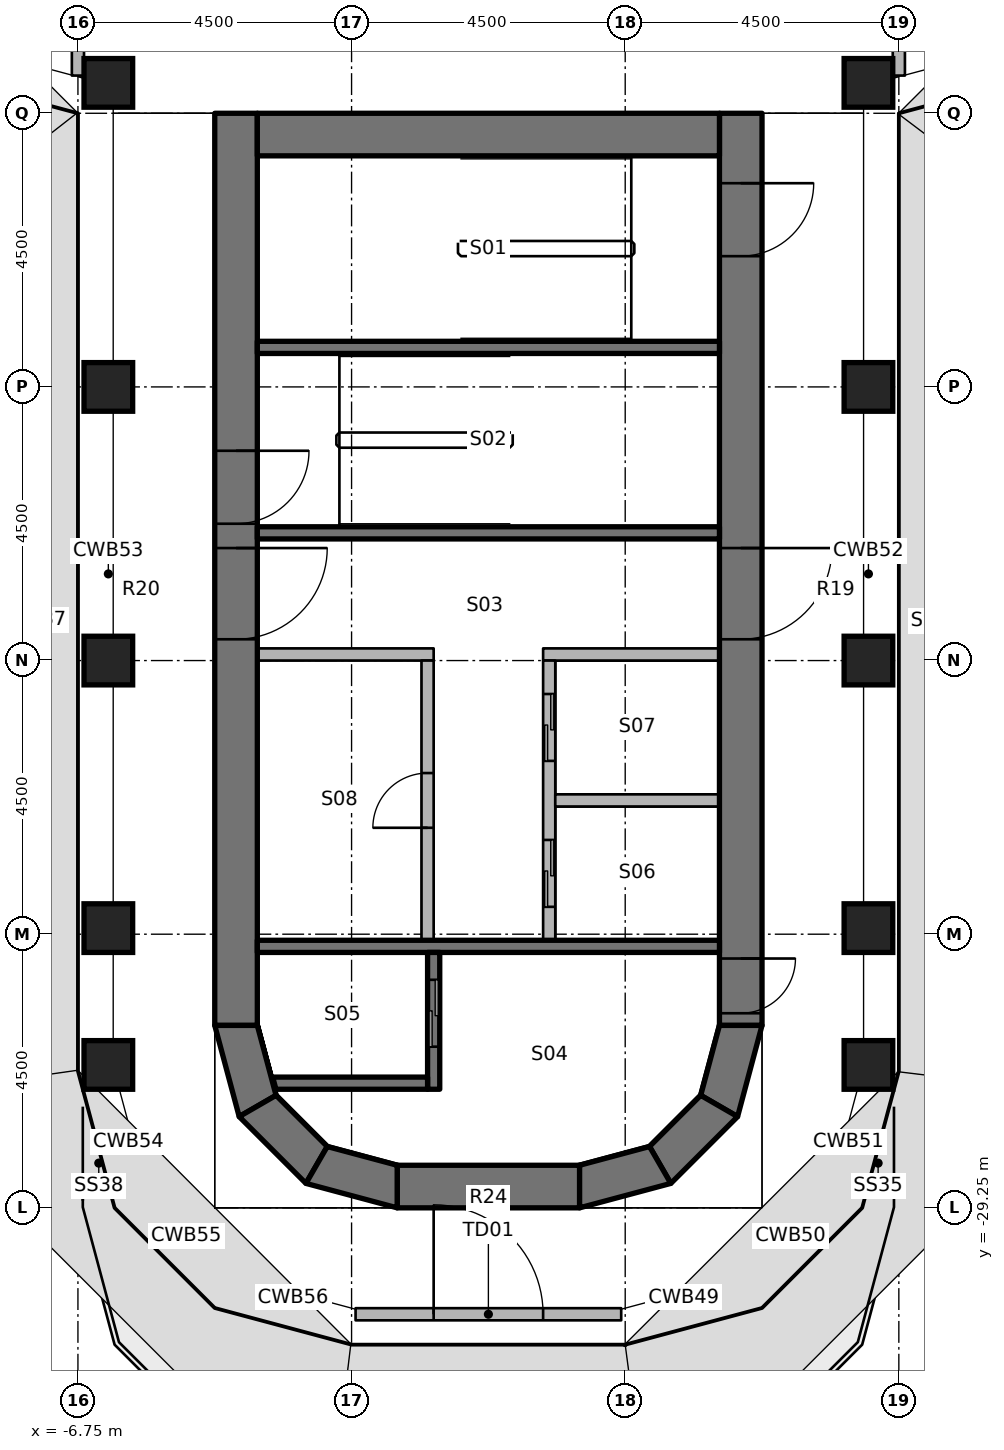
"""IFC4 building model, lengths in metres.
Left out: names, types, materials, properties, quantities, classifications, styles, units other than length and angle.
Written with IfcOpenShell. Run it as: python <this file> out.ifc"""

import sys

from ifc_helpers import new_model, si_unit, direction, frame, frame_2d, origin, origin_2d, place, context, subcontext, project, spatial, polyline, rectangle, outline, extrude, element, fill, save


model = new_model("IFC4")
c1 = context("Model", 3, precision=1e-05, world=origin(), true_north=direction((0.0, 1.0)))
c2 = subcontext(c1, "Body", "Model", "MODEL_VIEW")
j1 = project(units=[si_unit("LENGTHUNIT", "METRE"), si_unit("PLANEANGLEUNIT", "RADIAN")], contexts=[c1])
p1 = place(None, origin())
s1 = spatial("IfcSite", under=j1, at=p1, CompositionType="ELEMENT")
p2 = place(p1, origin())
s2 = spatial("IfcBuilding", under=s1, at=p2, CompositionType="ELEMENT")
p3 = place(p2, frame((0.0, 0.0, 156.2)))
s3 = spatial("IfcBuildingStorey", under=s2, at=p3, CompositionType="ELEMENT", Elevation=156.2)
for number, where, z_axis, x_axis in (
    (1, (-6.25, -26.9, 0.0), (0.0, 0.0, 1.0), (1.0, 0.0, 0.0)),
    (2, (-6.25, -24.65, 0.0), (0.0, 0.0, 1.0), (1.0, 0.0, 0.0)),
    (3, (-6.25, -20.25, 0.0), (0.0, 0.0, 1.0), (1.0, 0.0, 0.0)),
    (4, (-6.25, -15.75, 0.0), (0.0, 0.0, 1.0), (1.0, 0.0, 0.0)),
    (5, (-6.25, -10.75, 0.0), (0.0, 0.0, 1.0), (1.0, 0.0, 0.0)),
    (6, (6.25, -26.9, 0.0), (0.0, 0.0, 1.0), (1.0, 0.0, 0.0)),
    (7, (6.25, -24.65, 0.0), (0.0, 0.0, 1.0), (1.0, 0.0, 0.0)),
    (8, (6.25, -20.25, 0.0), (0.0, 0.0, 1.0), (1.0, 0.0, 0.0)),
    (9, (6.25, -15.75, 0.0), (0.0, 0.0, 1.0), (1.0, 0.0, 0.0)),
    (10, (6.25, -10.75, 0.0), (0.0, 0.0, 1.0), (1.0, 0.0, 0.0)),
):
    element("IfcColumn", number, at=place(p3, frame(where, z_axis=z_axis, x_axis=x_axis)), inside=s3, PredefinedType="COLUMN", context=c2, shape_type="SweptSolid", body=[
        extrude(rectangle(XDim=0.8, YDim=0.8, at=origin_2d()), origin(), (0.0, 0.0, 1.0), 3.65),
    ])
p4 = place(p3, frame((-4.15, -11.25, 0.0), z_axis=(0.0, 0.0, 1.0), x_axis=(0.0, -1.0, 0.0)))
e11 = element("IfcWall", 11, at=p4, inside=s3, PredefinedType="SHEAR", context=c2, shape_type="SweptSolid", body=[
    extrude(rectangle(XDim=15.0, YDim=0.7, at=frame_2d((7.5, 0.0))), origin(), (0.0, 0.0, 1.0), 3.8),
])
p5 = place(p4, frame((7.15, 0.0, 0.0)))
e12 = element("IfcOpeningElement", 12, at=p5, cuts=e11, PredefinedType="OPENING", context=c2, shape_type="SweptSolid", body=[
    extrude(rectangle(XDim=1.5, YDim=2.3, at=frame_2d((0.75, 1.15))), frame((0.0, 0.36, 0.0), z_axis=(0.0, -1.0, 0.0), x_axis=(1.0, 0.0, 0.0)), (0.0, 0.0, 1.0), 0.72),
])
p6 = place(p4, frame((5.55, 0.0, 0.0)))
e13 = element("IfcOpeningElement", 13, at=p6, cuts=e11, PredefinedType="OPENING", context=c2, shape_type="SweptSolid", body=[
    extrude(rectangle(XDim=1.2, YDim=2.1, at=frame_2d((0.6, 1.05))), frame((0.0, 0.36, 0.0), z_axis=(0.0, -1.0, 0.0), x_axis=(1.0, 0.0, 0.0)), (0.0, 0.0, 1.0), 0.72),
])
p7 = place(p3, frame((4.15, -11.25, 0.0), z_axis=(0.0, 0.0, 1.0), x_axis=(0.0, -1.0, 0.0)))
e14 = element("IfcWall", 14, at=p7, inside=s3, PredefinedType="SHEAR", context=c2, shape_type="SweptSolid", body=[
    extrude(rectangle(XDim=15.0, YDim=0.7, at=frame_2d((7.5, 0.0))), origin(), (0.0, 0.0, 1.0), 3.8),
])
p8 = place(p7, frame((7.15, 0.0, 0.0)))
e15 = element("IfcOpeningElement", 15, at=p8, cuts=e14, PredefinedType="OPENING", context=c2, shape_type="SweptSolid", body=[
    extrude(rectangle(XDim=1.5, YDim=2.3, at=frame_2d((0.75, 1.15))), frame((0.0, 0.36, 0.0), z_axis=(0.0, -1.0, 0.0), x_axis=(1.0, 0.0, 0.0)), (0.0, 0.0, 1.0), 0.72),
])
p9 = place(p7, frame((13.9, 0.0, 0.0)))
e16 = element("IfcOpeningElement", 16, at=p9, cuts=e14, PredefinedType="OPENING", context=c2, shape_type="SweptSolid", body=[
    extrude(rectangle(XDim=0.9, YDim=2.1, at=frame_2d((0.45, 1.05))), frame((0.0, 0.36, 0.0), z_axis=(0.0, -1.0, 0.0), x_axis=(1.0, 0.0, 0.0)), (0.0, 0.0, 1.0), 0.72),
])
p10 = place(p7, frame((1.15, 0.0, 0.0)))
e17 = element("IfcOpeningElement", 17, at=p10, cuts=e14, PredefinedType="OPENING", context=c2, shape_type="SweptSolid", body=[
    extrude(rectangle(XDim=1.2, YDim=2.1, at=frame_2d((0.6, 1.05))), frame((0.0, 0.36, 0.0), z_axis=(0.0, -1.0, 0.0), x_axis=(1.0, 0.0, 0.0)), (0.0, 0.0, 1.0), 0.72),
])
p11 = place(p3, frame((-3.8, -11.6, 0.0), z_axis=(0.0, 0.0, 1.0), x_axis=(1.0, 0.0, 0.0)))
e18 = element("IfcWall", 18, at=p11, inside=s3, PredefinedType="SHEAR", context=c2, shape_type="SweptSolid", body=[
    extrude(rectangle(XDim=7.6, YDim=0.7, at=frame_2d((3.8, 0.0))), origin(), (0.0, 0.0, 1.0), 3.8),
])
p12 = place(p3, frame((-1.5, -28.9, 0.0), z_axis=(0.0, 0.0, 1.0), x_axis=(1.0, 0.0, 0.0)))
e19 = element("IfcWall", 19, at=p12, inside=s3, PredefinedType="SHEAR", context=c2, shape_type="SweptSolid", body=[
    extrude(rectangle(XDim=3.0, YDim=0.7, at=frame_2d((1.5, 0.0))), origin(), (0.0, 0.0, 1.0), 3.8),
])
p13 = place(p3, origin())
e20 = element("IfcWall", 20, at=p13, inside=s3, PredefinedType="SHEAR", context=c2, shape_type="SweptSolid", body=[
    extrude(outline(polyline([(-4.5, -26.25), (-4.098, -27.75), (-3.492, -27.4), (-3.8, -26.25), (-4.5, -26.25)])), origin(), (0.0, 0.0, 1.0), 3.8),
])
p14 = place(p3, origin())
e21 = element("IfcWall", 21, at=p14, inside=s3, PredefinedType="SHEAR", context=c2, shape_type="SweptSolid", body=[
    extrude(outline(polyline([(-4.098, -27.75), (-3.0, -28.848), (-2.65, -28.242), (-3.492, -27.4), (-4.098, -27.75)])), origin(), (0.0, 0.0, 1.0), 3.8),
])
p15 = place(p3, origin())
e22 = element("IfcWall", 22, at=p15, inside=s3, PredefinedType="SHEAR", context=c2, shape_type="SweptSolid", body=[
    extrude(outline(polyline([(-3.0, -28.848), (-1.5, -29.25), (-1.5, -28.55), (-2.65, -28.242), (-3.0, -28.848)])), origin(), (0.0, 0.0, 1.0), 3.8),
])
p16 = place(p3, origin())
e23 = element("IfcWall", 23, at=p16, inside=s3, PredefinedType="SHEAR", context=c2, shape_type="SweptSolid", body=[
    extrude(outline(polyline([(4.5, -26.25), (4.098, -27.75), (3.492, -27.4), (3.8, -26.25), (4.5, -26.25)])), origin(), (0.0, 0.0, 1.0), 3.8),
])
p17 = place(p3, origin())
e24 = element("IfcWall", 24, at=p17, inside=s3, PredefinedType="SHEAR", context=c2, shape_type="SweptSolid", body=[
    extrude(outline(polyline([(4.098, -27.75), (3.0, -28.848), (2.65, -28.242), (3.492, -27.4), (4.098, -27.75)])), origin(), (0.0, 0.0, 1.0), 3.8),
])
p18 = place(p3, origin())
e25 = element("IfcWall", 25, at=p18, inside=s3, PredefinedType="SHEAR", context=c2, shape_type="SweptSolid", body=[
    extrude(outline(polyline([(3.0, -28.848), (1.5, -29.25), (1.5, -28.55), (2.65, -28.242), (3.0, -28.848)])), origin(), (0.0, 0.0, 1.0), 3.8),
])
p19 = place(p3, frame((-2.184, -31.0, 0.0), z_axis=(0.0, 0.0, 1.0), x_axis=(1.0, 0.0, 0.0)))
e26 = element("IfcWall", 26, at=p19, inside=s3, PredefinedType="SOLIDWALL", context=c2, shape_type="SweptSolid", body=[
    extrude(rectangle(XDim=4.368, YDim=0.2, at=frame_2d((2.184, 0.0))), origin(), (0.0, 0.0, 1.0), 2.75),
])
p20 = place(p19, frame((1.284, 0.0, 0.0)))
e27 = element("IfcOpeningElement", 27, at=p20, cuts=e26, PredefinedType="OPENING", context=c2, shape_type="SweptSolid", body=[
    extrude(rectangle(XDim=1.8, YDim=2.4, at=frame_2d((0.9, 1.2))), frame((0.0, 0.11, 0.0), z_axis=(0.0, -1.0, 0.0), x_axis=(1.0, 0.0, 0.0)), (0.0, 0.0, 1.0), 0.22),
])
p21 = place(p3, frame((3.8, -24.95, 0.0), z_axis=(0.0, 0.0, 1.0), x_axis=(-1.0, 0.0, 0.0)))
e28 = element("IfcWall", 28, at=p21, inside=s3, PredefinedType="SHEAR", context=c2, shape_type="SweptSolid", body=[
    extrude(rectangle(XDim=7.6, YDim=0.2, at=frame_2d((3.8, 0.0))), origin(), (0.0, 0.0, 1.0), 3.65),
])
p22 = place(p3, frame((-0.9, -27.3, 0.0), z_axis=(0.0, 0.0, 1.0), x_axis=(0.0, 1.0, 0.0)))
e29 = element("IfcWall", 29, at=p22, inside=s3, PredefinedType="SHEAR", context=c2, shape_type="SweptSolid", body=[
    extrude(rectangle(XDim=2.25, YDim=0.2, at=frame_2d((1.125, 0.0))), origin(), (0.0, 0.0, 1.0), 3.65),
])
p23 = place(p22, frame((0.7, 0.0, 0.0)))
e30 = element("IfcOpeningElement", 30, at=p23, cuts=e29, PredefinedType="OPENING", context=c2, shape_type="SweptSolid", body=[
    extrude(rectangle(XDim=1.1, YDim=2.3, at=frame_2d((0.55, 1.15))), frame((0.0, 0.11, 0.0), z_axis=(0.0, -1.0, 0.0), x_axis=(1.0, 0.0, 0.0)), (0.0, 0.0, 1.0), 0.22),
])
p24 = place(p3, origin())
e31 = element("IfcWall", 31, at=p24, inside=s3, PredefinedType="SHEAR", context=c2, shape_type="SweptSolid", body=[
    extrude(outline(polyline([(-1.0, -27.1), (-3.548, -27.1), (-3.494, -27.3), (-1.0, -27.3), (-1.0, -27.1)])), origin(), (0.0, 0.0, 1.0), 3.65),
])
for number, where, z_axis, x_axis in (
    (32, (3.8, -18.15, 0.0), (0.0, 0.0, 1.0), (-1.0, 0.0, 0.0)),
    (33, (3.8, -15.1, 0.0), (0.0, 0.0, 1.0), (-1.0, 0.0, 0.0)),
):
    element("IfcWall", number, at=place(p3, frame(where, z_axis=z_axis, x_axis=x_axis)), inside=s3, PredefinedType="SHEAR", context=c2, shape_type="SweptSolid", body=[
        extrude(rectangle(XDim=7.6, YDim=0.2, at=frame_2d((3.8, 0.0))), origin(), (0.0, 0.0, 1.0), 3.65),
    ])
p25 = place(p3, frame((3.8, -20.15, 0.0), z_axis=(0.0, 0.0, 1.0), x_axis=(-1.0, 0.0, 0.0)))
e34 = element("IfcWall", 34, at=p25, inside=s3, PredefinedType="PARTITIONING", context=c2, shape_type="SweptSolid", body=[
    extrude(rectangle(XDim=2.9, YDim=0.2, at=frame_2d((1.45, 0.0))), origin(), (0.0, 0.0, 1.0), 3.65),
])
p26 = place(p3, frame((1.0, -24.85, 0.0), z_axis=(0.0, 0.0, 1.0), x_axis=(0.0, 1.0, 0.0)))
e35 = element("IfcWall", 35, at=p26, inside=s3, PredefinedType="PARTITIONING", context=c2, shape_type="SweptSolid", body=[
    extrude(rectangle(XDim=4.6, YDim=0.2, at=frame_2d((2.3, 0.0))), origin(), (0.0, 0.0, 1.0), 3.65),
])
p27 = place(p26, frame((0.55, 0.0, 0.0)))
e36 = element("IfcOpeningElement", 36, at=p27, cuts=e35, PredefinedType="OPENING", context=c2, shape_type="SweptSolid", body=[
    extrude(rectangle(XDim=1.1, YDim=2.3, at=frame_2d((0.55, 1.15))), frame((0.0, 0.11, 0.0), z_axis=(0.0, -1.0, 0.0), x_axis=(1.0, 0.0, 0.0)), (0.0, 0.0, 1.0), 0.22),
])
p28 = place(p26, frame((2.95, 0.0, 0.0)))
e37 = element("IfcOpeningElement", 37, at=p28, cuts=e35, PredefinedType="OPENING", context=c2, shape_type="SweptSolid", body=[
    extrude(rectangle(XDim=1.1, YDim=2.3, at=frame_2d((0.55, 1.15))), frame((0.0, 0.11, 0.0), z_axis=(0.0, -1.0, 0.0), x_axis=(1.0, 0.0, 0.0)), (0.0, 0.0, 1.0), 0.22),
])
p29 = place(p3, frame((-0.9, -20.15, 0.0), z_axis=(0.0, 0.0, 1.0), x_axis=(-1.0, 0.0, 0.0)))
e38 = element("IfcWall", 38, at=p29, inside=s3, PredefinedType="PARTITIONING", context=c2, shape_type="SweptSolid", body=[
    extrude(rectangle(XDim=2.9, YDim=0.2, at=frame_2d((1.45, 0.0))), origin(), (0.0, 0.0, 1.0), 3.65),
])
p30 = place(p3, frame((-1.0, -24.85, 0.0), z_axis=(0.0, 0.0, 1.0), x_axis=(0.0, 1.0, 0.0)))
e39 = element("IfcWall", 39, at=p30, inside=s3, PredefinedType="PARTITIONING", context=c2, shape_type="SweptSolid", body=[
    extrude(rectangle(XDim=4.6, YDim=0.2, at=frame_2d((2.3, 0.0))), origin(), (0.0, 0.0, 1.0), 3.65),
])
p31 = place(p30, frame((1.85, 0.0, 0.0)))
e40 = element("IfcOpeningElement", 40, at=p31, cuts=e39, PredefinedType="OPENING", context=c2, shape_type="SweptSolid", body=[
    extrude(rectangle(XDim=0.9, YDim=2.1, at=frame_2d((0.45, 1.05))), frame((0.0, 0.11, 0.0), z_axis=(0.0, -1.0, 0.0), x_axis=(1.0, 0.0, 0.0)), (0.0, 0.0, 1.0), 0.22),
])
p32 = place(p3, frame((3.8, -22.55, 0.0), z_axis=(0.0, 0.0, 1.0), x_axis=(-1.0, 0.0, 0.0)))
e41 = element("IfcWall", 41, at=p32, inside=s3, PredefinedType="PARTITIONING", context=c2, shape_type="SweptSolid", body=[
    extrude(rectangle(XDim=2.7, YDim=0.2, at=frame_2d((1.35, 0.0))), origin(), (0.0, 0.0, 1.0), 3.65),
])
for number, where, z_axis, x_axis in (
    (42, (6.75, -10.63, 0.0), (0.0, 0.0, 1.0), (0.0, 1.0, 0.0)),
    (43, (-6.75, -10.63, 0.0), (0.0, 0.0, 1.0), (0.0, 1.0, 0.0)),
):
    element("IfcWall", number, at=place(p3, frame(where, z_axis=z_axis, x_axis=x_axis)), inside=s3, PredefinedType="PARTITIONING", context=c2, shape_type="SweptSolid", body=[
        extrude(rectangle(XDim=3.78, YDim=0.2, at=frame_2d((1.89, 0.0))), origin(), (0.0, 0.0, 1.0), 2.75),
    ])
p33 = place(p20, origin())
e44 = element("IfcDoor", 44, at=p33, inside=s3, OperationType="SINGLE_SWING_LEFT", PredefinedType="DOOR", context=c2, shape_type="SweptSolid", body=[
    extrude(rectangle(XDim=1.8, YDim=2.4, at=frame_2d((0.9, 1.2))), frame((0.0, 0.025, 0.0), z_axis=(0.0, -1.0, 0.0), x_axis=(1.0, 0.0, 0.0)), (0.0, 0.0, 1.0), 0.05),
])
fill(e27, e44)
p34 = place(p8, origin())
e45 = element("IfcDoor", 45, at=p34, inside=s3, OperationType="DOUBLE_DOOR_SINGLE_SWING", PredefinedType="DOOR", context=c2, shape_type="SweptSolid", body=[
    extrude(rectangle(XDim=1.5, YDim=2.3, at=frame_2d((0.75, 1.15))), frame((0.0, 0.025, 0.0), z_axis=(0.0, -1.0, 0.0), x_axis=(1.0, 0.0, 0.0)), (0.0, 0.0, 1.0), 0.05),
])
fill(e15, e45)
p35 = place(p5, origin())
e46 = element("IfcDoor", 46, at=p35, inside=s3, OperationType="DOUBLE_DOOR_SINGLE_SWING", PredefinedType="DOOR", context=c2, shape_type="SweptSolid", body=[
    extrude(rectangle(XDim=1.5, YDim=2.3, at=frame_2d((0.75, 1.15))), frame((0.0, 0.025, 0.0), z_axis=(0.0, -1.0, 0.0), x_axis=(1.0, 0.0, 0.0)), (0.0, 0.0, 1.0), 0.05),
])
fill(e12, e46)
p36 = place(p9, origin())
e47 = element("IfcDoor", 47, at=p36, inside=s3, OperationType="SINGLE_SWING_LEFT", PredefinedType="DOOR", context=c2, shape_type="SweptSolid", body=[
    extrude(rectangle(XDim=0.9, YDim=2.1, at=frame_2d((0.45, 1.05))), frame((0.0, 0.025, 0.0), z_axis=(0.0, -1.0, 0.0), x_axis=(1.0, 0.0, 0.0)), (0.0, 0.0, 1.0), 0.05),
])
fill(e16, e47)
p37 = place(p6, origin())
e48 = element("IfcDoor", 48, at=p37, inside=s3, OperationType="SINGLE_SWING_LEFT", PredefinedType="DOOR", context=c2, shape_type="SweptSolid", body=[
    extrude(rectangle(XDim=1.2, YDim=2.1, at=frame_2d((0.6, 1.05))), frame((0.0, 0.025, 0.0), z_axis=(0.0, -1.0, 0.0), x_axis=(1.0, 0.0, 0.0)), (0.0, 0.0, 1.0), 0.05),
])
fill(e13, e48)
p38 = place(p10, origin())
e49 = element("IfcDoor", 49, at=p38, inside=s3, OperationType="SINGLE_SWING_LEFT", PredefinedType="DOOR", context=c2, shape_type="SweptSolid", body=[
    extrude(rectangle(XDim=1.2, YDim=2.1, at=frame_2d((0.6, 1.05))), frame((0.0, 0.025, 0.0), z_axis=(0.0, -1.0, 0.0), x_axis=(1.0, 0.0, 0.0)), (0.0, 0.0, 1.0), 0.05),
])
fill(e17, e49)
p39 = place(p23, origin())
e50 = element("IfcDoor", 50, at=p39, inside=s3, OperationType="DOUBLE_DOOR_SLIDING", PredefinedType="DOOR", context=c2, shape_type="SweptSolid", body=[
    extrude(rectangle(XDim=1.1, YDim=2.3, at=frame_2d((0.55, 1.15))), frame((0.0, 0.025, 0.0), z_axis=(0.0, -1.0, 0.0), x_axis=(1.0, 0.0, 0.0)), (0.0, 0.0, 1.0), 0.05),
])
fill(e30, e50)
p40 = place(p27, origin())
e51 = element("IfcDoor", 51, at=p40, inside=s3, OperationType="DOUBLE_DOOR_SLIDING", PredefinedType="DOOR", context=c2, shape_type="SweptSolid", body=[
    extrude(rectangle(XDim=1.1, YDim=2.3, at=frame_2d((0.55, 1.15))), frame((0.0, 0.025, 0.0), z_axis=(0.0, -1.0, 0.0), x_axis=(1.0, 0.0, 0.0)), (0.0, 0.0, 1.0), 0.05),
])
fill(e36, e51)
p41 = place(p28, origin())
e52 = element("IfcDoor", 52, at=p41, inside=s3, OperationType="DOUBLE_DOOR_SLIDING", PredefinedType="DOOR", context=c2, shape_type="SweptSolid", body=[
    extrude(rectangle(XDim=1.1, YDim=2.3, at=frame_2d((0.55, 1.15))), frame((0.0, 0.025, 0.0), z_axis=(0.0, -1.0, 0.0), x_axis=(1.0, 0.0, 0.0)), (0.0, 0.0, 1.0), 0.05),
])
fill(e37, e52)
p42 = place(p31, origin())
e53 = element("IfcDoor", 53, at=p42, inside=s3, OperationType="SINGLE_SWING_LEFT", PredefinedType="DOOR", context=c2, shape_type="SweptSolid", body=[
    extrude(rectangle(XDim=0.9, YDim=2.1, at=frame_2d((0.45, 1.05))), frame((0.0, 0.025, 0.0), z_axis=(0.0, -1.0, 0.0), x_axis=(1.0, 0.0, 0.0)), (0.0, 0.0, 1.0), 0.05),
])
fill(e40, e53)
save(model, sys.argv[1])
